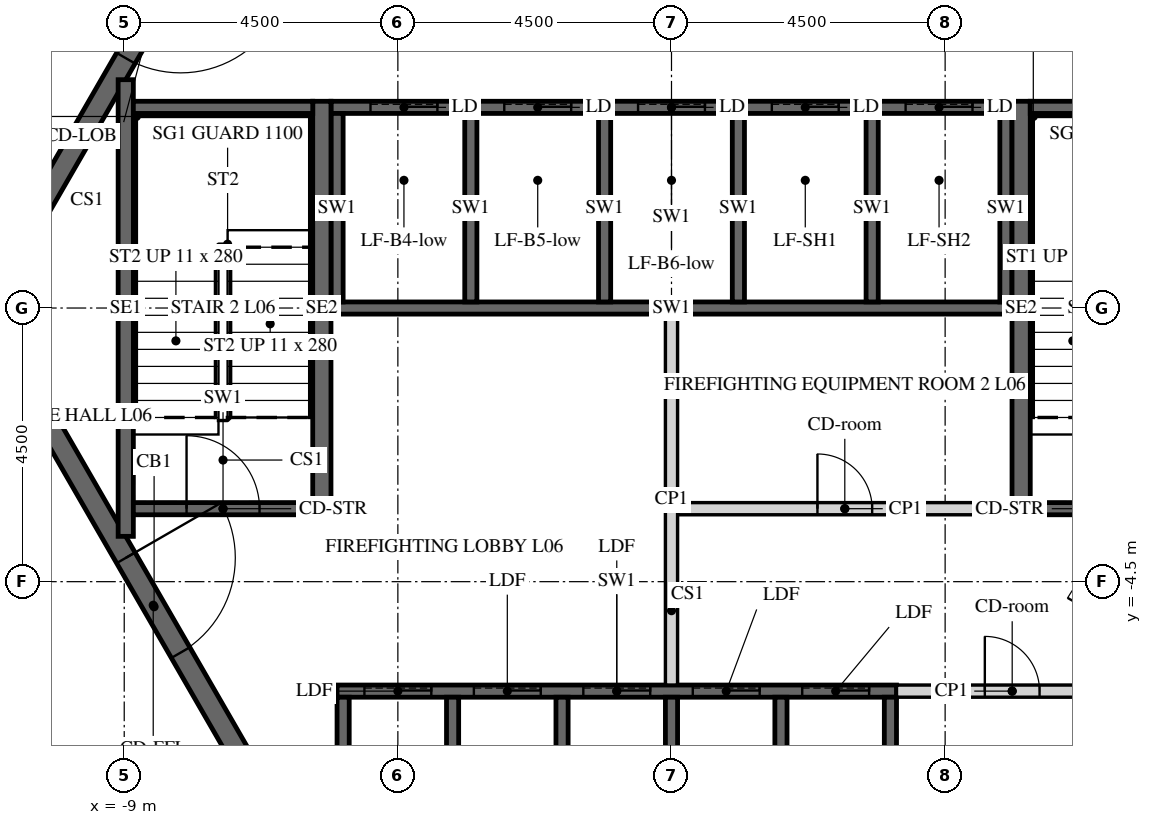
"""IFC4 building model, lengths in metres.
Left out: names, types, materials, properties, quantities, classifications, styles, units other than length and angle.
Written with IfcOpenShell. Run it as: python <this file> out.ifc"""

import sys

from ifc_helpers import new_model, si_unit, direction, frame, frame_2d, origin, place, context, subcontext, project, spatial, polyline, rectangle, outline, extrude, element, fill, save


model = new_model("IFC4")
c1 = context("Model", 3, precision=1e-05, world=origin(), true_north=direction((0.0, 1.0)))
c2 = subcontext(c1, "Body", "Model", "MODEL_VIEW")
j1 = project(units=[si_unit("LENGTHUNIT", "METRE"), si_unit("PLANEANGLEUNIT", "RADIAN")], contexts=[c1])
p1 = place(None, origin())
s1 = spatial("IfcSite", under=j1, at=p1, CompositionType="ELEMENT")
p2 = place(p1, origin())
s2 = spatial("IfcBuilding", under=s1, at=p2, CompositionType="ELEMENT")
p3 = place(p2, frame((0.0, 0.0, 37.5)))
s3 = spatial("IfcBuildingStorey", under=s2, at=p3, CompositionType="ELEMENT", Elevation=37.5)
p4 = place(p3, frame((-7.91, 13.7, -0.15), z_axis=(0.0, 0.0, 1.0), x_axis=(-0.499999880136, -0.866025472988, 0.0)))
e1 = element("IfcWall", 1, at=p4, inside=s3, PredefinedType="SHEAR", context=c2, shape_type="SweptSolid", body=[
    extrude(outline(polyline([(-0.173, -0.3), (15.993, -0.3), (15.646, 0.3), (0.173, 0.3), (-0.173, -0.3)])), origin(), (0.0, 0.0, 1.0), 3.9),
])
p5 = place(p4, frame((7.039, 0.0, 0.15)))
e2 = element("IfcOpeningElement", 2, at=p5, cuts=e1, PredefinedType="OPENING", context=c2, shape_type="SweptSolid", body=[
    extrude(rectangle(XDim=1.8, YDim=2.4, at=frame_2d((0.9, 1.2))), frame((0.0, 0.31, 0.0), z_axis=(0.0, -1.0, 0.0), x_axis=(1.0, 0.0, 0.0)), (0.0, 0.0, 1.0), 0.62),
])
p6 = place(p3, frame((-15.819, 0.0, -0.15), z_axis=(0.0, 0.0, 1.0), x_axis=(0.499999880136, -0.866025472988, 0.0)))
e3 = element("IfcWall", 3, at=p6, inside=s3, PredefinedType="SHEAR", context=c2, shape_type="SweptSolid", body=[
    extrude(outline(polyline([(-0.173, -0.3), (15.993, -0.3), (15.646, 0.3), (0.173, 0.3), (-0.173, -0.3)])), origin(), (0.0, 0.0, 1.0), 3.9),
])
p7 = place(p6, frame((6.981, 0.0, 0.15)))
e4 = element("IfcOpeningElement", 4, at=p7, cuts=e3, PredefinedType="OPENING", context=c2, shape_type="SweptSolid", body=[
    extrude(rectangle(XDim=1.8, YDim=2.4, at=frame_2d((0.9, 1.2))), frame((0.0, 0.31, 0.0), z_axis=(0.0, -1.0, 0.0), x_axis=(1.0, 0.0, 0.0)), (0.0, 0.0, 1.0), 0.62),
])
p8 = place(p3, frame((-5.673, 9.825, -0.15), z_axis=(0.0, 0.0, 1.0), x_axis=(-0.499995046907, -0.866028263435, 0.0)))
e5 = element("IfcWall", 5, at=p8, inside=s3, PredefinedType="SHEAR", context=c2, shape_type="SweptSolid", body=[
    extrude(outline(polyline([(-0.101, -0.175), (11.446, -0.175), (11.244, 0.175), (0.101, 0.175), (-0.101, -0.175)])), origin(), (0.0, 0.0, 1.0), 3.9),
])
p9 = place(p8, frame((4.801, 0.0, 0.15)))
e6 = element("IfcOpeningElement", 6, at=p9, cuts=e5, PredefinedType="OPENING", context=c2, shape_type="SweptSolid", body=[
    extrude(rectangle(XDim=1.8, YDim=2.4, at=frame_2d((0.9, 1.2))), frame((0.0, 0.185, 0.0), z_axis=(0.0, -1.0, 0.0), x_axis=(1.0, 0.0, 0.0)), (0.0, 0.0, 1.0), 0.37),
])
p10 = place(p3, frame((-11.345, 0.0, -0.15), z_axis=(0.0, 0.0, 1.0), x_axis=(0.499995046907, -0.866028263435, 0.0)))
e7 = element("IfcWall", 7, at=p10, inside=s3, PredefinedType="SHEAR", context=c2, shape_type="SweptSolid", body=[
    extrude(outline(polyline([(-0.101, -0.175), (11.446, -0.175), (11.244, 0.175), (0.101, 0.175), (-0.101, -0.175)])), origin(), (0.0, 0.0, 1.0), 3.9),
])
p11 = place(p10, frame((4.744, 0.0, 0.15)))
e8 = element("IfcOpeningElement", 8, at=p11, cuts=e7, PredefinedType="OPENING", context=c2, shape_type="SweptSolid", body=[
    extrude(rectangle(XDim=1.8, YDim=2.4, at=frame_2d((0.9, 1.2))), frame((0.0, 0.185, 0.0), z_axis=(0.0, -1.0, 0.0), x_axis=(1.0, 0.0, 0.0)), (0.0, 0.0, 1.0), 0.37),
])
p12 = place(p3, frame((5.673, -9.825, -0.15), z_axis=(0.0, 0.0, 1.0), x_axis=(0.499995046907, 0.866028263435, 0.0)))
e9 = element("IfcWall", 9, at=p12, inside=s3, PredefinedType="SHEAR", context=c2, shape_type="SweptSolid", body=[
    extrude(outline(polyline([(-0.101, -0.175), (11.446, -0.175), (11.244, 0.175), (0.101, 0.175), (-0.101, -0.175)])), origin(), (0.0, 0.0, 1.0), 3.9),
])
p13 = place(p12, frame((4.801, 0.0, 0.15)))
e10 = element("IfcOpeningElement", 10, at=p13, cuts=e9, PredefinedType="OPENING", context=c2, shape_type="SweptSolid", body=[
    extrude(rectangle(XDim=1.8, YDim=2.4, at=frame_2d((0.9, 1.2))), frame((0.0, 0.185, 0.0), z_axis=(0.0, -1.0, 0.0), x_axis=(1.0, 0.0, 0.0)), (0.0, 0.0, 1.0), 0.37),
])
p14 = place(p3, frame((11.345, 0.0, -0.15), z_axis=(0.0, 0.0, 1.0), x_axis=(-0.499995046907, 0.866028263435, 0.0)))
e11 = element("IfcWall", 11, at=p14, inside=s3, PredefinedType="SHEAR", context=c2, shape_type="SweptSolid", body=[
    extrude(outline(polyline([(-0.101, -0.175), (11.446, -0.175), (11.244, 0.175), (0.101, 0.175), (-0.101, -0.175)])), origin(), (0.0, 0.0, 1.0), 3.9),
])
p15 = place(p14, frame((4.744, 0.0, 0.15)))
e12 = element("IfcOpeningElement", 12, at=p15, cuts=e11, PredefinedType="OPENING", context=c2, shape_type="SweptSolid", body=[
    extrude(rectangle(XDim=1.8, YDim=2.4, at=frame_2d((0.9, 1.2))), frame((0.0, 0.185, 0.0), z_axis=(0.0, -1.0, 0.0), x_axis=(1.0, 0.0, 0.0)), (0.0, 0.0, 1.0), 0.37),
])
p16 = place(p3, frame((-5.6, 3.3, -0.25), z_axis=(0.0, 0.0, 1.0), x_axis=(1.0, 0.0, 0.0)))
e13 = element("IfcWall", 13, at=p16, inside=s3, PredefinedType="SHEAR", context=c2, shape_type="SweptSolid", body=[
    extrude(rectangle(XDim=11.2, YDim=0.2, at=frame_2d((5.6, 0.0))), origin(), (0.0, 0.0, 1.0), 3.9),
])
p17 = place(p16, frame((0.65, 0.0, 0.25)))
e14 = element("IfcOpeningElement", 14, at=p17, cuts=e13, PredefinedType="OPENING", context=c2, shape_type="SweptSolid", body=[
    extrude(rectangle(XDim=1.1, YDim=2.1, at=frame_2d((0.55, 1.05))), frame((0.0, 0.11, 0.0), z_axis=(0.0, -1.0, 0.0), x_axis=(1.0, 0.0, 0.0)), (0.0, 0.0, 1.0), 0.22),
])
p18 = place(p16, frame((2.85, 0.0, 0.25)))
e15 = element("IfcOpeningElement", 15, at=p18, cuts=e13, PredefinedType="OPENING", context=c2, shape_type="SweptSolid", body=[
    extrude(rectangle(XDim=1.1, YDim=2.1, at=frame_2d((0.55, 1.05))), frame((0.0, 0.11, 0.0), z_axis=(0.0, -1.0, 0.0), x_axis=(1.0, 0.0, 0.0)), (0.0, 0.0, 1.0), 0.22),
])
p19 = place(p16, frame((5.05, 0.0, 0.25)))
e16 = element("IfcOpeningElement", 16, at=p19, cuts=e13, PredefinedType="OPENING", context=c2, shape_type="SweptSolid", body=[
    extrude(rectangle(XDim=1.1, YDim=2.1, at=frame_2d((0.55, 1.05))), frame((0.0, 0.11, 0.0), z_axis=(0.0, -1.0, 0.0), x_axis=(1.0, 0.0, 0.0)), (0.0, 0.0, 1.0), 0.22),
])
p20 = place(p16, frame((7.25, 0.0, 0.25)))
e17 = element("IfcOpeningElement", 17, at=p20, cuts=e13, PredefinedType="OPENING", context=c2, shape_type="SweptSolid", body=[
    extrude(rectangle(XDim=1.1, YDim=2.1, at=frame_2d((0.55, 1.05))), frame((0.0, 0.11, 0.0), z_axis=(0.0, -1.0, 0.0), x_axis=(1.0, 0.0, 0.0)), (0.0, 0.0, 1.0), 0.22),
])
p21 = place(p16, frame((9.45, 0.0, 0.25)))
e18 = element("IfcOpeningElement", 18, at=p21, cuts=e13, PredefinedType="OPENING", context=c2, shape_type="SweptSolid", body=[
    extrude(rectangle(XDim=1.1, YDim=2.1, at=frame_2d((0.55, 1.05))), frame((0.0, 0.11, 0.0), z_axis=(0.0, -1.0, 0.0), x_axis=(1.0, 0.0, 0.0)), (0.0, 0.0, 1.0), 0.22),
])
p22 = place(p3, frame((-5.6, 0.0, -0.25), z_axis=(0.0, 0.0, 1.0), x_axis=(1.0, 0.0, 0.0)))
e19 = element("IfcWall", 19, at=p22, inside=s3, PredefinedType="SHEAR", context=c2, shape_type="SweptSolid", body=[
    extrude(rectangle(XDim=11.2, YDim=0.2, at=frame_2d((5.6, 0.0))), origin(), (0.0, 0.0, 1.0), 3.9),
])
for number, where, z_axis, x_axis in (
    (20, (-5.5, 0.1, -0.25), (0.0, 0.0, 1.0), (0.0, 1.0, 0.0)),
    (21, (-3.3, 0.1, -0.25), (0.0, 0.0, 1.0), (0.0, 1.0, 0.0)),
    (22, (-1.1, 0.1, -0.25), (0.0, 0.0, 1.0), (0.0, 1.0, 0.0)),
    (23, (1.1, 0.1, -0.25), (0.0, 0.0, 1.0), (0.0, 1.0, 0.0)),
    (24, (3.3, 0.1, -0.25), (0.0, 0.0, 1.0), (0.0, 1.0, 0.0)),
    (25, (5.5, 0.1, -0.25), (0.0, 0.0, 1.0), (0.0, 1.0, 0.0)),
):
    element("IfcWall", number, at=place(p3, frame(where, z_axis=z_axis, x_axis=x_axis)), inside=s3, PredefinedType="SHEAR", context=c2, shape_type="SweptSolid", body=[
        extrude(rectangle(XDim=3.1, YDim=0.2, at=frame_2d((1.55, 0.0))), origin(), (0.0, 0.0, 1.0), 3.9),
    ])
p23 = place(p3, frame((-5.5, -6.3, -0.25), z_axis=(0.0, 0.0, 1.0), x_axis=(1.0, 0.0, 0.0)))
e26 = element("IfcWall", 26, at=p23, inside=s3, PredefinedType="SHEAR", context=c2, shape_type="SweptSolid", body=[
    extrude(rectangle(XDim=9.2, YDim=0.2, at=frame_2d((4.6, 0.0))), origin(), (0.0, 0.0, 1.0), 3.9),
])
p24 = place(p23, frame((0.45, 0.0, 0.25)))
e27 = element("IfcOpeningElement", 27, at=p24, cuts=e26, PredefinedType="OPENING", context=c2, shape_type="SweptSolid", body=[
    extrude(rectangle(XDim=1.1, YDim=2.1, at=frame_2d((0.55, 1.05))), frame((0.0, 0.11, 0.0), z_axis=(0.0, -1.0, 0.0), x_axis=(1.0, 0.0, 0.0)), (0.0, 0.0, 1.0), 0.22),
])
p25 = place(p23, frame((2.25, 0.0, 0.25)))
e28 = element("IfcOpeningElement", 28, at=p25, cuts=e26, PredefinedType="OPENING", context=c2, shape_type="SweptSolid", body=[
    extrude(rectangle(XDim=1.1, YDim=2.1, at=frame_2d((0.55, 1.05))), frame((0.0, 0.11, 0.0), z_axis=(0.0, -1.0, 0.0), x_axis=(1.0, 0.0, 0.0)), (0.0, 0.0, 1.0), 0.22),
])
p26 = place(p23, frame((4.05, 0.0, 0.25)))
e29 = element("IfcOpeningElement", 29, at=p26, cuts=e26, PredefinedType="OPENING", context=c2, shape_type="SweptSolid", body=[
    extrude(rectangle(XDim=1.1, YDim=2.1, at=frame_2d((0.55, 1.05))), frame((0.0, 0.11, 0.0), z_axis=(0.0, -1.0, 0.0), x_axis=(1.0, 0.0, 0.0)), (0.0, 0.0, 1.0), 0.22),
])
p27 = place(p23, frame((5.85, 0.0, 0.25)))
e30 = element("IfcOpeningElement", 30, at=p27, cuts=e26, PredefinedType="OPENING", context=c2, shape_type="SweptSolid", body=[
    extrude(rectangle(XDim=1.1, YDim=2.1, at=frame_2d((0.55, 1.05))), frame((0.0, 0.11, 0.0), z_axis=(0.0, -1.0, 0.0), x_axis=(1.0, 0.0, 0.0)), (0.0, 0.0, 1.0), 0.22),
])
p28 = place(p23, frame((7.65, 0.0, 0.25)))
e31 = element("IfcOpeningElement", 31, at=p28, cuts=e26, PredefinedType="OPENING", context=c2, shape_type="SweptSolid", body=[
    extrude(rectangle(XDim=1.1, YDim=2.1, at=frame_2d((0.55, 1.05))), frame((0.0, 0.11, 0.0), z_axis=(0.0, -1.0, 0.0), x_axis=(1.0, 0.0, 0.0)), (0.0, 0.0, 1.0), 0.22),
])
for number, where, z_axis, x_axis in (
    (32, (-5.4, -9.3, -0.25), (0.0, 0.0, 1.0), (0.0, 1.0, 0.0)),
    (33, (-3.6, -9.3, -0.25), (0.0, 0.0, 1.0), (0.0, 1.0, 0.0)),
    (34, (-1.8, -9.3, -0.25), (0.0, 0.0, 1.0), (0.0, 1.0, 0.0)),
    (35, (0.0, -9.3, -0.25), (0.0, 0.0, 1.0), (0.0, 1.0, 0.0)),
    (36, (1.8, -9.3, -0.25), (0.0, 0.0, 1.0), (0.0, 1.0, 0.0)),
    (37, (3.6, -9.3, -0.25), (0.0, 0.0, 1.0), (0.0, 1.0, 0.0)),
):
    element("IfcWall", number, at=place(p3, frame(where, z_axis=z_axis, x_axis=x_axis)), inside=s3, PredefinedType="SHEAR", context=c2, shape_type="SweptSolid", body=[
        extrude(rectangle(XDim=2.9, YDim=0.2, at=frame_2d((1.45, 0.0))), origin(), (0.0, 0.0, 1.0), 3.9),
    ])
p29 = place(p3, frame((0.1, -3.3, 0.0), z_axis=(0.0, 0.0, 1.0), x_axis=(1.0, 0.0, 0.0)))
e38 = element("IfcWall", 38, at=p29, inside=s3, PredefinedType="PARTITIONING", context=c2, shape_type="SweptSolid", body=[
    extrude(rectangle(XDim=5.5, YDim=0.2, at=frame_2d((2.75, 0.0))), origin(), (0.0, 0.0, 1.0), 3.65),
])
p30 = place(p29, frame((2.3, 0.0, 0.0)))
e39 = element("IfcOpeningElement", 39, at=p30, cuts=e38, PredefinedType="OPENING", context=c2, shape_type="SweptSolid", body=[
    extrude(rectangle(XDim=0.9, YDim=2.1, at=frame_2d((0.45, 1.05))), frame((0.0, 0.11, 0.0), z_axis=(0.0, -1.0, 0.0), x_axis=(1.0, 0.0, 0.0)), (0.0, 0.0, 1.0), 0.22),
])
p31 = place(p3, frame((0.0, -6.2, 0.0), z_axis=(0.0, 0.0, 1.0), x_axis=(0.0, 1.0, 0.0)))
e40 = element("IfcWall", 40, at=p31, inside=s3, PredefinedType="PARTITIONING", context=c2, shape_type="SweptSolid", body=[
    extrude(rectangle(XDim=6.1, YDim=0.2, at=frame_2d((3.05, 0.0))), origin(), (0.0, 0.0, 1.0), 3.65),
])
p32 = place(p3, frame((3.7, -6.3, 0.0), z_axis=(0.0, 0.0, 1.0), x_axis=(1.0, 0.0, 0.0)))
e41 = element("IfcWall", 41, at=p32, inside=s3, PredefinedType="PARTITIONING", context=c2, shape_type="SweptSolid", body=[
    extrude(rectangle(XDim=3.806, YDim=0.2, at=frame_2d((1.903, 0.0))), origin(), (0.0, 0.0, 1.0), 3.65),
])
p33 = place(p32, frame((1.453, 0.0, 0.0)))
e42 = element("IfcOpeningElement", 42, at=p33, cuts=e41, PredefinedType="OPENING", context=c2, shape_type="SweptSolid", body=[
    extrude(rectangle(XDim=0.9, YDim=2.1, at=frame_2d((0.45, 1.05))), frame((0.0, 0.11, 0.0), z_axis=(0.0, -1.0, 0.0), x_axis=(1.0, 0.0, 0.0)), (0.0, 0.0, 1.0), 0.22),
])
p34 = place(p3, frame((5.75, -3.4, -0.25), z_axis=(0.0, 0.0, 1.0), x_axis=(0.0, 1.0, 0.0)))
e43 = element("IfcWall", 43, at=p34, inside=s3, PredefinedType="SHEAR", context=c2, shape_type="SweptSolid", body=[
    extrude(rectangle(XDim=6.8, YDim=0.3, at=frame_2d((3.4, 0.0))), origin(), (0.0, 0.0, 1.0), 3.9),
])
p35 = place(p3, frame((5.9, 3.3, -0.25), z_axis=(0.0, 0.0, 1.0), x_axis=(1.0, 0.0, 0.0)))
e44 = element("IfcWall", 44, at=p35, inside=s3, PredefinedType="SHEAR", context=c2, shape_type="SweptSolid", body=[
    extrude(rectangle(XDim=2.95, YDim=0.2, at=frame_2d((1.475, 0.0))), origin(), (0.0, 0.0, 1.0), 3.9),
])
p36 = place(p3, frame((5.9, -3.3, -0.25), z_axis=(0.0, 0.0, 1.0), x_axis=(1.0, 0.0, 0.0)))
e45 = element("IfcWall", 45, at=p36, inside=s3, PredefinedType="SHEAR", context=c2, shape_type="SweptSolid", body=[
    extrude(rectangle(XDim=2.95, YDim=0.2, at=frame_2d((1.475, 0.0))), origin(), (0.0, 0.0, 1.0), 3.9),
])
p37 = place(p36, frame((0.875, 0.0, 0.25)))
e46 = element("IfcOpeningElement", 46, at=p37, cuts=e45, PredefinedType="OPENING", context=c2, shape_type="SweptSolid", body=[
    extrude(rectangle(XDim=1.2, YDim=2.4, at=frame_2d((0.6, 1.2))), frame((0.0, 0.11, 0.0), z_axis=(0.0, -1.0, 0.0), x_axis=(1.0, 0.0, 0.0)), (0.0, 0.0, 1.0), 0.22),
])
p38 = place(p3, frame((-5.75, -3.4, -0.25), z_axis=(0.0, 0.0, 1.0), x_axis=(0.0, 1.0, 0.0)))
e47 = element("IfcWall", 47, at=p38, inside=s3, PredefinedType="SHEAR", context=c2, shape_type="SweptSolid", body=[
    extrude(rectangle(XDim=6.8, YDim=0.3, at=frame_2d((3.4, 0.0))), origin(), (0.0, 0.0, 1.0), 3.9),
])
p39 = place(p3, frame((-8.975, -3.755, -0.25), z_axis=(0.0, 0.0, 1.0), x_axis=(0.0, 1.0, 0.0)))
e48 = element("IfcWall", 48, at=p39, inside=s3, PredefinedType="SHEAR", context=c2, shape_type="SweptSolid", body=[
    extrude(rectangle(XDim=7.51, YDim=0.25, at=frame_2d((3.755, 0.0))), origin(), (0.0, 0.0, 1.0), 3.9),
])
p40 = place(p3, frame((-8.85, 3.3, -0.25), z_axis=(0.0, 0.0, 1.0), x_axis=(1.0, 0.0, 0.0)))
e49 = element("IfcWall", 49, at=p40, inside=s3, PredefinedType="SHEAR", context=c2, shape_type="SweptSolid", body=[
    extrude(rectangle(XDim=2.95, YDim=0.2, at=frame_2d((1.475, 0.0))), origin(), (0.0, 0.0, 1.0), 3.9),
])
p41 = place(p3, frame((-8.85, -3.3, -0.25), z_axis=(0.0, 0.0, 1.0), x_axis=(1.0, 0.0, 0.0)))
e50 = element("IfcWall", 50, at=p41, inside=s3, PredefinedType="SHEAR", context=c2, shape_type="SweptSolid", body=[
    extrude(rectangle(XDim=2.95, YDim=0.2, at=frame_2d((1.475, 0.0))), origin(), (0.0, 0.0, 1.0), 3.9),
])
p42 = place(p41, frame((0.875, 0.0, 0.25)))
e51 = element("IfcOpeningElement", 51, at=p42, cuts=e50, PredefinedType="OPENING", context=c2, shape_type="SweptSolid", body=[
    extrude(rectangle(XDim=1.2, YDim=2.4, at=frame_2d((0.6, 1.2))), frame((0.0, 0.11, 0.0), z_axis=(0.0, -1.0, 0.0), x_axis=(1.0, 0.0, 0.0)), (0.0, 0.0, 1.0), 0.22),
])
p43 = place(p9, origin())
e52 = element("IfcDoor", 52, at=p43, inside=s3, OperationType="DOUBLE_DOOR_SINGLE_SWING", PredefinedType="DOOR", context=c2, shape_type="SweptSolid", body=[
    extrude(rectangle(XDim=1.8, YDim=2.4, at=frame_2d((0.9, 1.2))), frame((0.0, 0.025, 0.0), z_axis=(0.0, -1.0, 0.0), x_axis=(1.0, 0.0, 0.0)), (0.0, 0.0, 1.0), 0.05),
])
fill(e6, e52)
p44 = place(p11, origin())
e53 = element("IfcDoor", 53, at=p44, inside=s3, OperationType="DOUBLE_DOOR_SINGLE_SWING", PredefinedType="DOOR", context=c2, shape_type="SweptSolid", body=[
    extrude(rectangle(XDim=1.8, YDim=2.4, at=frame_2d((0.9, 1.2))), frame((0.0, 0.025, 0.0), z_axis=(0.0, -1.0, 0.0), x_axis=(1.0, 0.0, 0.0)), (0.0, 0.0, 1.0), 0.05),
])
fill(e8, e53)
p45 = place(p30, origin())
e54 = element("IfcDoor", 54, at=p45, inside=s3, OperationType="SINGLE_SWING_LEFT", PredefinedType="DOOR", context=c2, shape_type="SweptSolid", body=[
    extrude(rectangle(XDim=0.9, YDim=2.1, at=frame_2d((0.45, 1.05))), frame((0.0, 0.025, 0.0), z_axis=(0.0, -1.0, 0.0), x_axis=(1.0, 0.0, 0.0)), (0.0, 0.0, 1.0), 0.05),
])
fill(e39, e54)
p46 = place(p33, origin())
e55 = element("IfcDoor", 55, at=p46, inside=s3, OperationType="SINGLE_SWING_LEFT", PredefinedType="DOOR", context=c2, shape_type="SweptSolid", body=[
    extrude(rectangle(XDim=0.9, YDim=2.1, at=frame_2d((0.45, 1.05))), frame((0.0, 0.025, 0.0), z_axis=(0.0, -1.0, 0.0), x_axis=(1.0, 0.0, 0.0)), (0.0, 0.0, 1.0), 0.05),
])
fill(e42, e55)
p47 = place(p42, origin())
e56 = element("IfcDoor", 56, at=p47, inside=s3, OperationType="SINGLE_SWING_LEFT", PredefinedType="DOOR", context=c2, shape_type="SweptSolid", body=[
    extrude(rectangle(XDim=1.2, YDim=2.4, at=frame_2d((0.6, 1.2))), frame((0.0, 0.025, 0.0), z_axis=(0.0, -1.0, 0.0), x_axis=(1.0, 0.0, 0.0)), (0.0, 0.0, 1.0), 0.05),
])
fill(e51, e56)
p48 = place(p17, origin())
e57 = element("IfcDoor", 57, at=p48, inside=s3, OperationType="SLIDING_TO_LEFT", PredefinedType="DOOR", context=c2, shape_type="SweptSolid", body=[
    extrude(rectangle(XDim=1.1, YDim=2.1, at=frame_2d((0.55, 1.05))), frame((0.0, 0.025, 0.0), z_axis=(0.0, -1.0, 0.0), x_axis=(1.0, 0.0, 0.0)), (0.0, 0.0, 1.0), 0.05),
])
fill(e14, e57)
p49 = place(p18, origin())
e58 = element("IfcDoor", 58, at=p49, inside=s3, OperationType="SLIDING_TO_LEFT", PredefinedType="DOOR", context=c2, shape_type="SweptSolid", body=[
    extrude(rectangle(XDim=1.1, YDim=2.1, at=frame_2d((0.55, 1.05))), frame((0.0, 0.025, 0.0), z_axis=(0.0, -1.0, 0.0), x_axis=(1.0, 0.0, 0.0)), (0.0, 0.0, 1.0), 0.05),
])
fill(e15, e58)
p50 = place(p19, origin())
e59 = element("IfcDoor", 59, at=p50, inside=s3, OperationType="SLIDING_TO_LEFT", PredefinedType="DOOR", context=c2, shape_type="SweptSolid", body=[
    extrude(rectangle(XDim=1.1, YDim=2.1, at=frame_2d((0.55, 1.05))), frame((0.0, 0.025, 0.0), z_axis=(0.0, -1.0, 0.0), x_axis=(1.0, 0.0, 0.0)), (0.0, 0.0, 1.0), 0.05),
])
fill(e16, e59)
p51 = place(p20, origin())
e60 = element("IfcDoor", 60, at=p51, inside=s3, OperationType="SLIDING_TO_LEFT", PredefinedType="DOOR", context=c2, shape_type="SweptSolid", body=[
    extrude(rectangle(XDim=1.1, YDim=2.1, at=frame_2d((0.55, 1.05))), frame((0.0, 0.025, 0.0), z_axis=(0.0, -1.0, 0.0), x_axis=(1.0, 0.0, 0.0)), (0.0, 0.0, 1.0), 0.05),
])
fill(e17, e60)
p52 = place(p21, origin())
e61 = element("IfcDoor", 61, at=p52, inside=s3, OperationType="SLIDING_TO_LEFT", PredefinedType="DOOR", context=c2, shape_type="SweptSolid", body=[
    extrude(rectangle(XDim=1.1, YDim=2.1, at=frame_2d((0.55, 1.05))), frame((0.0, 0.025, 0.0), z_axis=(0.0, -1.0, 0.0), x_axis=(1.0, 0.0, 0.0)), (0.0, 0.0, 1.0), 0.05),
])
fill(e18, e61)
p53 = place(p24, origin())
e62 = element("IfcDoor", 62, at=p53, inside=s3, OperationType="SLIDING_TO_LEFT", PredefinedType="DOOR", context=c2, shape_type="SweptSolid", body=[
    extrude(rectangle(XDim=1.1, YDim=2.1, at=frame_2d((0.55, 1.05))), frame((0.0, 0.025, 0.0), z_axis=(0.0, -1.0, 0.0), x_axis=(1.0, 0.0, 0.0)), (0.0, 0.0, 1.0), 0.05),
])
fill(e27, e62)
p54 = place(p25, origin())
e63 = element("IfcDoor", 63, at=p54, inside=s3, OperationType="SLIDING_TO_LEFT", PredefinedType="DOOR", context=c2, shape_type="SweptSolid", body=[
    extrude(rectangle(XDim=1.1, YDim=2.1, at=frame_2d((0.55, 1.05))), frame((0.0, 0.025, 0.0), z_axis=(0.0, -1.0, 0.0), x_axis=(1.0, 0.0, 0.0)), (0.0, 0.0, 1.0), 0.05),
])
fill(e28, e63)
p55 = place(p26, origin())
e64 = element("IfcDoor", 64, at=p55, inside=s3, OperationType="SLIDING_TO_LEFT", PredefinedType="DOOR", context=c2, shape_type="SweptSolid", body=[
    extrude(rectangle(XDim=1.1, YDim=2.1, at=frame_2d((0.55, 1.05))), frame((0.0, 0.025, 0.0), z_axis=(0.0, -1.0, 0.0), x_axis=(1.0, 0.0, 0.0)), (0.0, 0.0, 1.0), 0.05),
])
fill(e29, e64)
p56 = place(p27, origin())
e65 = element("IfcDoor", 65, at=p56, inside=s3, OperationType="SLIDING_TO_LEFT", PredefinedType="DOOR", context=c2, shape_type="SweptSolid", body=[
    extrude(rectangle(XDim=1.1, YDim=2.1, at=frame_2d((0.55, 1.05))), frame((0.0, 0.025, 0.0), z_axis=(0.0, -1.0, 0.0), x_axis=(1.0, 0.0, 0.0)), (0.0, 0.0, 1.0), 0.05),
])
fill(e30, e65)
p57 = place(p28, origin())
e66 = element("IfcDoor", 66, at=p57, inside=s3, OperationType="SLIDING_TO_LEFT", PredefinedType="DOOR", context=c2, shape_type="SweptSolid", body=[
    extrude(rectangle(XDim=1.1, YDim=2.1, at=frame_2d((0.55, 1.05))), frame((0.0, 0.025, 0.0), z_axis=(0.0, -1.0, 0.0), x_axis=(1.0, 0.0, 0.0)), (0.0, 0.0, 1.0), 0.05),
])
fill(e31, e66)
save(model, sys.argv[1])
